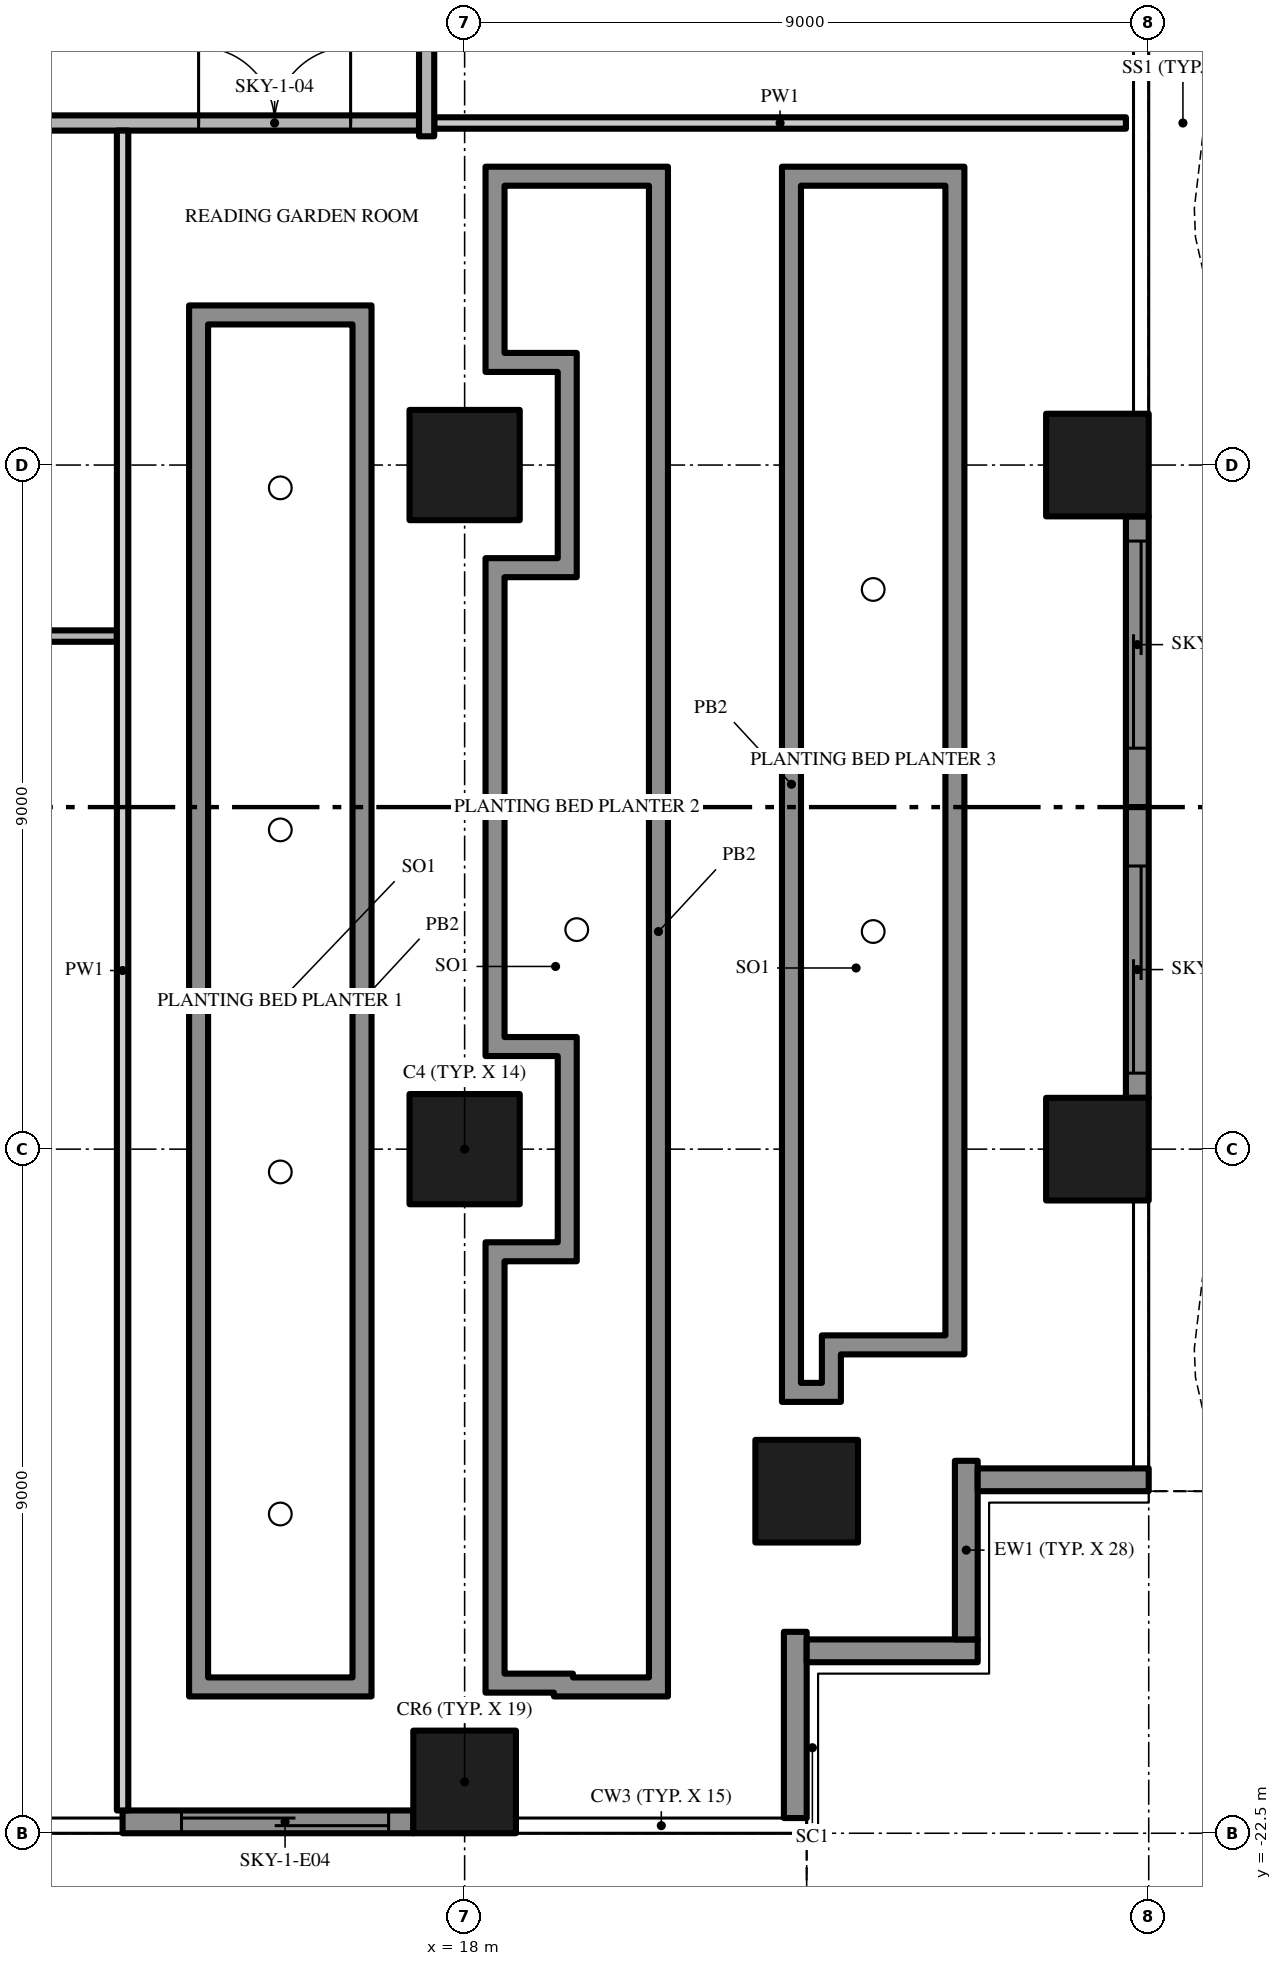
"""IFC4 building model, lengths in metres.
Left out: names, types, materials, properties, quantities, classifications, styles, units other than length and angle.
Written with IfcOpenShell. Run it as: python <this file> out.ifc"""

import sys

from ifc_helpers import new_model, si_unit, direction, frame, frame_2d, origin, origin_2d, place, context, subcontext, project, spatial, polyline, rectangle, outline, extrude, element, fill, save


model = new_model("IFC4")
c1 = context("Model", 3, precision=1e-05, world=origin(), true_north=direction((0.0, 1.0)))
c2 = subcontext(c1, "Body", "Model", "MODEL_VIEW")
j1 = project(units=[si_unit("LENGTHUNIT", "METRE"), si_unit("PLANEANGLEUNIT", "RADIAN")], contexts=[c1])
p1 = place(None, origin())
s1 = spatial("IfcSite", under=j1, at=p1, CompositionType="ELEMENT")
p2 = place(p1, origin())
s2 = spatial("IfcBuilding", under=s1, at=p2, CompositionType="ELEMENT")
p3 = place(p2, frame((0.0, 0.0, 64.4)))
s3 = spatial("IfcBuildingStorey", under=s2, at=p3, CompositionType="ELEMENT", Elevation=64.4)
p4 = place(p3, frame((18.0, -13.5, 0.0), z_axis=(0.0, 0.0, 1.0), x_axis=(1.0, 0.0, 0.0)))
e1 = element("IfcColumn", 1, at=p4, inside=s3, PredefinedType="COLUMN", context=c2, shape_type="SweptSolid", body=[
    extrude(rectangle(XDim=1.45, YDim=1.45, at=origin_2d()), origin(), (0.0, 0.0, 1.0), 4.7),
])
p5 = place(p3, frame((18.0, -21.825, 0.0), z_axis=(0.0, 0.0, 1.0), x_axis=(1.0, 0.0, 0.0)))
e2 = element("IfcColumn", 2, at=p5, inside=s3, PredefinedType="COLUMN", context=c2, shape_type="SweptSolid", body=[
    extrude(rectangle(XDim=1.35, YDim=1.35, at=origin_2d()), origin(), (0.0, 0.0, 1.0), 4.7),
])
p6 = place(p3, frame((18.0, -4.5, 0.0), z_axis=(0.0, 0.0, 1.0), x_axis=(1.0, 0.0, 0.0)))
e3 = element("IfcColumn", 3, at=p6, inside=s3, PredefinedType="COLUMN", context=c2, shape_type="SweptSolid", body=[
    extrude(rectangle(XDim=1.45, YDim=1.45, at=origin_2d()), origin(), (0.0, 0.0, 1.0), 4.7),
])
for number, where, z_axis, x_axis in (
    (4, (26.325, -13.5, 0.0), (0.0, 0.0, 1.0), (1.0, 0.0, 0.0)),
    (5, (22.5, -18.0, 0.0), (0.0, 0.0, 1.0), (1.0, 0.0, 0.0)),
    (6, (26.325, -4.5, 0.0), (0.0, 0.0, 1.0), (1.0, 0.0, 0.0)),
):
    element("IfcColumn", number, at=place(p3, frame(where, z_axis=z_axis, x_axis=x_axis)), inside=s3, PredefinedType="COLUMN", context=c2, shape_type="SweptSolid", body=[
        extrude(rectangle(XDim=1.35, YDim=1.35, at=origin_2d()), origin(), (0.0, 0.0, 1.0), 4.7),
    ])
p7 = place(p3, frame((17.325, -22.35, 0.0), z_axis=(0.0, 0.0, 1.0), x_axis=(-1.0, 0.0, 0.0)))
e7 = element("IfcWall", 7, at=p7, inside=s3, PredefinedType="SOLIDWALL", context=c2, shape_type="SweptSolid", body=[
    extrude(rectangle(XDim=3.825, YDim=0.3, at=frame_2d((1.913, 0.0))), origin(), (0.0, 0.0, 1.0), 4.7),
])
p8 = place(p7, frame((0.325, 0.0, 0.0)))
e8 = element("IfcOpeningElement", 8, at=p8, cuts=e7, PredefinedType="OPENING", context=c2, shape_type="SweptSolid", body=[
    extrude(rectangle(XDim=2.725, YDim=2.4, at=frame_2d((1.363, 1.2))), frame((0.0, 0.16, 0.0), z_axis=(0.0, -1.0, 0.0), x_axis=(1.0, 0.0, 0.0)), (0.0, 0.0, 1.0), 0.32),
])
p9 = place(p3, frame((22.35, -19.85, 0.0), z_axis=(0.0, 0.0, 1.0), x_axis=(0.0, -1.0, 0.0)))
e9 = element("IfcWall", 9, at=p9, inside=s3, PredefinedType="SOLIDWALL", context=c2, shape_type="SweptSolid", body=[
    extrude(rectangle(XDim=2.45, YDim=0.3, at=frame_2d((1.225, 0.0))), origin(), (0.0, 0.0, 1.0), 4.7),
])
p10 = place(p3, frame((24.75, -20.1, 0.0), z_axis=(0.0, 0.0, 1.0), x_axis=(-1.0, 0.0, 0.0)))
e10 = element("IfcWall", 10, at=p10, inside=s3, PredefinedType="SOLIDWALL", context=c2, shape_type="SweptSolid", body=[
    extrude(rectangle(XDim=2.25, YDim=0.3, at=frame_2d((1.125, 0.0))), origin(), (0.0, 0.0, 1.0), 4.7),
])
p11 = place(p3, frame((24.6, -17.6, 0.0), z_axis=(0.0, 0.0, 1.0), x_axis=(0.0, -1.0, 0.0)))
e11 = element("IfcWall", 11, at=p11, inside=s3, PredefinedType="SOLIDWALL", context=c2, shape_type="SweptSolid", body=[
    extrude(rectangle(XDim=2.35, YDim=0.3, at=frame_2d((1.175, 0.0))), origin(), (0.0, 0.0, 1.0), 4.7),
])
p12 = place(p3, frame((27.0, -17.85, 0.0), z_axis=(0.0, 0.0, 1.0), x_axis=(-1.0, 0.0, 0.0)))
e12 = element("IfcWall", 12, at=p12, inside=s3, PredefinedType="SOLIDWALL", context=c2, shape_type="SweptSolid", body=[
    extrude(rectangle(XDim=2.25, YDim=0.3, at=frame_2d((1.125, 0.0))), origin(), (0.0, 0.0, 1.0), 4.7),
])
p13 = place(p3, frame((26.85, -9.0, 0.0), z_axis=(0.0, 0.0, 1.0), x_axis=(0.0, -1.0, 0.0)))
e13 = element("IfcWall", 13, at=p13, inside=s3, PredefinedType="SOLIDWALL", context=c2, shape_type="SweptSolid", body=[
    extrude(rectangle(XDim=3.825, YDim=0.3, at=frame_2d((1.913, 0.0))), origin(), (0.0, 0.0, 1.0), 4.7),
])
p14 = place(p13, frame((0.775, 0.0, 0.0)))
e14 = element("IfcOpeningElement", 14, at=p14, cuts=e13, PredefinedType="OPENING", context=c2, shape_type="SweptSolid", body=[
    extrude(rectangle(XDim=2.725, YDim=2.4, at=frame_2d((1.363, 1.2))), frame((0.0, 0.16, 0.0), z_axis=(0.0, -1.0, 0.0), x_axis=(1.0, 0.0, 0.0)), (0.0, 0.0, 1.0), 0.32),
])
p15 = place(p3, frame((26.85, -5.175, 0.0), z_axis=(0.0, 0.0, 1.0), x_axis=(0.0, -1.0, 0.0)))
e15 = element("IfcWall", 15, at=p15, inside=s3, PredefinedType="SOLIDWALL", context=c2, shape_type="SweptSolid", body=[
    extrude(rectangle(XDim=3.825, YDim=0.3, at=frame_2d((1.913, 0.0))), origin(), (0.0, 0.0, 1.0), 4.7),
])
p16 = place(p15, frame((0.325, 0.0, 0.0)))
e16 = element("IfcOpeningElement", 16, at=p16, cuts=e15, PredefinedType="OPENING", context=c2, shape_type="SweptSolid", body=[
    extrude(rectangle(XDim=2.725, YDim=2.4, at=frame_2d((1.363, 1.2))), frame((0.0, 0.16, 0.0), z_axis=(0.0, -1.0, 0.0), x_axis=(1.0, 0.0, 0.0)), (0.0, 0.0, 1.0), 0.32),
])
p17 = place(p3, origin())
e17 = element("IfcWall", 17, at=p17, inside=s3, PredefinedType="USERDEFINED", context=c2, shape_type="SweptSolid", body=[
    extrude(outline(polyline([(-22.5, -23.451), (-21.0, -23.115), (-20.625, -23.1), (-19.5, -23.231), (-18.0, -23.755), (-16.5, -24.488), (-15.0, -25.149), (-13.5, -25.485), (-13.125, -25.5), (-12.0, -25.369), (-10.5, -24.845), (-9.0, -24.112), (-7.5, -23.451), (-6.0, -23.115), (-5.625, -23.1), (-4.5, -23.231), (-3.0, -23.755), (-1.5, -24.488), (0.0, -25.149), (1.5, -25.485), (1.875, -25.5), (3.0, -25.369), (4.5, -24.845), (6.0, -24.112), (7.5, -23.451), (9.0, -23.115), (9.375, -23.1), (10.5, -23.231), (12.0, -23.755), (13.5, -24.488), (15.0, -25.149), (16.5, -25.485), (16.875, -25.5), (18.0, -25.369), (19.5, -24.845), (21.0, -24.112), (22.5, -23.451), (22.399, -23.223), (20.895, -23.885), (19.404, -24.614), (17.944, -25.124), (16.865, -25.249), (16.533, -25.236), (15.079, -24.91), (13.605, -24.261), (12.096, -23.524), (10.556, -22.986), (9.385, -22.849), (8.967, -22.866), (7.421, -23.213), (5.895, -23.885), (4.404, -24.614), (2.944, -25.124), (1.865, -25.249), (1.533, -25.236), (0.079, -24.91), (-1.395, -24.261), (-2.904, -23.524), (-4.444, -22.986), (-5.615, -22.849), (-6.033, -22.866), (-7.579, -23.213), (-9.105, -23.885), (-10.596, -24.614), (-12.056, -25.124), (-13.135, -25.249), (-13.467, -25.236), (-14.921, -24.91), (-16.395, -24.261), (-17.904, -23.524), (-19.444, -22.986), (-20.615, -22.849), (-21.033, -22.866), (-22.555, -23.208), (-22.5, -23.451)])), origin(), (0.0, 0.0, 1.0), 0.9),
])
p18 = place(p3, origin())
e18 = element("IfcWall", 18, at=p18, inside=s3, PredefinedType="USERDEFINED", context=c2, shape_type="SweptSolid", body=[
    extrude(outline(polyline([(27.951, -18.0), (27.615, -16.5), (27.6, -16.125), (27.731, -15.0), (28.255, -13.5), (28.988, -12.0), (29.649, -10.5), (29.985, -9.0), (30.0, -8.625), (29.869, -7.5), (29.345, -6.0), (28.612, -4.5), (27.951, -3.0), (27.615, -1.5), (27.6, -1.125), (27.731, 0.0), (28.255, 1.5), (28.988, 3.0), (29.649, 4.5), (29.985, 6.0), (30.0, 6.375), (29.869, 7.5), (29.345, 9.0), (28.612, 10.5), (27.951, 12.0), (27.615, 13.5), (27.6, 13.875), (27.731, 15.0), (28.255, 16.5), (28.988, 18.0), (28.763, 18.11), (28.024, 16.596), (27.486, 15.056), (27.349, 13.885), (27.366, 13.467), (27.713, 11.921), (28.385, 10.395), (29.114, 8.904), (29.624, 7.444), (29.749, 6.365), (29.736, 6.033), (29.41, 4.579), (28.761, 3.105), (28.024, 1.596), (27.486, 0.056), (27.349, -1.115), (27.366, -1.533), (27.713, -3.079), (28.385, -4.605), (29.114, -6.096), (29.624, -7.556), (29.749, -8.635), (29.736, -8.967), (29.41, -10.421), (28.761, -11.895), (28.024, -13.404), (27.486, -14.944), (27.349, -16.115), (27.366, -16.533), (27.708, -18.055), (27.951, -18.0)])), origin(), (0.0, 0.0, 1.0), 0.9),
])
p19 = place(p3, frame((-11.15, -6.75, 0.0), z_axis=(0.0, 0.0, 1.0), x_axis=(1.0, 0.0, 0.0)))
e19 = element("IfcWall", 19, at=p19, inside=s3, PredefinedType="PARTITIONING", context=c2, shape_type="SweptSolid", body=[
    extrude(rectangle(XDim=24.575, YDim=0.15, at=frame_2d((12.287, 0.0))), origin(), (0.0, 0.0, 1.0), 4.7),
])
p20 = place(p19, frame((11.35, 0.0, 0.0)))
e20 = element("IfcOpeningElement", 20, at=p20, cuts=e19, PredefinedType="OPENING", context=c2, shape_type="SweptSolid", body=[
    extrude(rectangle(XDim=1.8, YDim=2.4, at=frame_2d((0.9, 1.2))), frame((0.0, 0.085, 0.0), z_axis=(0.0, -1.0, 0.0), x_axis=(1.0, 0.0, 0.0)), (0.0, 0.0, 1.0), 0.17),
])
p21 = place(p3, frame((-11.15, 0.0, 0.0), z_axis=(0.0, 0.0, 1.0), x_axis=(1.0, 0.0, 0.0)))
e21 = element("IfcWall", 21, at=p21, inside=s3, PredefinedType="PARTITIONING", context=c2, shape_type="SweptSolid", body=[
    extrude(rectangle(XDim=28.55, YDim=0.2, at=frame_2d((14.275, 0.0))), origin(), (0.0, 0.0, 1.0), 4.7),
])
p22 = place(p21, frame((11.25, 0.0, 0.0)))
e22 = element("IfcOpeningElement", 22, at=p22, cuts=e21, PredefinedType="OPENING", context=c2, shape_type="SweptSolid", body=[
    extrude(rectangle(XDim=2.0, YDim=2.4, at=frame_2d((1.0, 1.2))), frame((0.0, 0.11, 0.0), z_axis=(0.0, -1.0, 0.0), x_axis=(1.0, 0.0, 0.0)), (0.0, 0.0, 1.0), 0.22),
])
p23 = place(p21, frame((25.65, 0.0, 0.0)))
e23 = element("IfcOpeningElement", 23, at=p23, cuts=e21, PredefinedType="OPENING", context=c2, shape_type="SweptSolid", body=[
    extrude(rectangle(XDim=2.0, YDim=2.4, at=frame_2d((1.0, 1.2))), frame((0.0, 0.11, 0.0), z_axis=(0.0, -1.0, 0.0), x_axis=(1.0, 0.0, 0.0)), (0.0, 0.0, 1.0), 0.22),
])
p24 = place(p3, frame((17.6, 0.0, 0.0), z_axis=(0.0, 0.0, 1.0), x_axis=(1.0, 0.0, 0.0)))
e24 = element("IfcWall", 24, at=p24, inside=s3, PredefinedType="PARTITIONING", context=c2, shape_type="SweptSolid", body=[
    extrude(rectangle(XDim=9.1, YDim=0.15, at=frame_2d((4.55, 0.0))), origin(), (0.0, 0.0, 1.0), 4.7),
])
p25 = place(p3, frame((13.5, -22.2, 0.0), z_axis=(0.0, 0.0, 1.0), x_axis=(0.0, 1.0, 0.0)))
e25 = element("IfcWall", 25, at=p25, inside=s3, PredefinedType="PARTITIONING", context=c2, shape_type="SweptSolid", body=[
    extrude(rectangle(XDim=22.1, YDim=0.15, at=frame_2d((11.05, 0.0))), origin(), (0.0, 0.0, 1.0), 4.7),
])
p26 = place(p3, frame((17.5, -0.175, 0.0), z_axis=(0.0, 0.0, 1.0), x_axis=(0.0, 1.0, 0.0)))
e26 = element("IfcWall", 26, at=p26, inside=s3, PredefinedType="PARTITIONING", context=c2, shape_type="SweptSolid", body=[
    extrude(rectangle(XDim=3.95, YDim=0.2, at=frame_2d((1.975, 0.0))), origin(), (0.0, 0.0, 1.0), 4.7),
])
p27 = place(p3, origin())
e27 = element("IfcWall", 27, at=p27, inside=s3, PredefinedType="USERDEFINED", context=c2, shape_type="SweptSolid", body=[
    extrude(outline(polyline([(16.775, -20.7), (16.775, -2.4), (14.375, -2.4), (14.375, -20.7), (16.775, -20.7)]), holes=[polyline([(14.625, -20.45), (14.625, -2.65), (16.525, -2.65), (16.525, -20.45), (14.625, -20.45)])]), origin(), (0.0, 0.0, 1.0), 0.9),
])
p28 = place(p3, origin())
e28 = element("IfcWall", 28, at=p28, inside=s3, PredefinedType="USERDEFINED", context=c2, shape_type="SweptSolid", body=[
    extrude(outline(polyline([(20.675, -20.7), (20.675, -0.575), (18.275, -0.575), (18.275, -3.275), (19.225, -3.275), (19.225, -5.725), (18.275, -5.725), (18.275, -12.275), (19.225, -12.275), (19.225, -14.725), (18.275, -14.725), (18.275, -20.65), (19.175, -20.65), (19.175, -20.7), (20.675, -20.7)]), holes=[polyline([(19.425, -20.45), (19.425, -20.4), (18.525, -20.4), (18.525, -14.975), (19.475, -14.975), (19.475, -12.025), (18.525, -12.025), (18.525, -5.975), (19.475, -5.975), (19.475, -3.025), (18.525, -3.025), (18.525, -0.825), (20.425, -0.825), (20.425, -20.45), (19.425, -20.45)])]), origin(), (0.0, 0.0, 1.0), 0.9),
])
p29 = place(p3, origin())
e29 = element("IfcWall", 29, at=p29, inside=s3, PredefinedType="USERDEFINED", context=c2, shape_type="SweptSolid", body=[
    extrude(outline(polyline([(24.575, -16.2), (24.575, -0.575), (22.175, -0.575), (22.175, -16.825), (22.95, -16.825), (22.95, -16.2), (24.575, -16.2)]), holes=[polyline([(22.7, -15.95), (22.7, -16.575), (22.425, -16.575), (22.425, -0.825), (24.325, -0.825), (24.325, -15.95), (22.7, -15.95)])]), origin(), (0.0, 0.0, 1.0), 0.9),
])
p30 = place(p8, origin())
e30 = element("IfcDoor", 30, at=p30, inside=s3, OperationType="SINGLE_SWING_LEFT", PredefinedType="DOOR", context=c2, shape_type="SweptSolid", body=[
    extrude(rectangle(XDim=2.725, YDim=2.4, at=frame_2d((1.363, 1.2))), frame((0.0, 0.025, 0.0), z_axis=(0.0, -1.0, 0.0), x_axis=(1.0, 0.0, 0.0)), (0.0, 0.0, 1.0), 0.05),
])
fill(e8, e30)
p31 = place(p14, origin())
e31 = element("IfcDoor", 31, at=p31, inside=s3, OperationType="SINGLE_SWING_LEFT", PredefinedType="DOOR", context=c2, shape_type="SweptSolid", body=[
    extrude(rectangle(XDim=2.725, YDim=2.4, at=frame_2d((1.363, 1.2))), frame((0.0, 0.025, 0.0), z_axis=(0.0, -1.0, 0.0), x_axis=(1.0, 0.0, 0.0)), (0.0, 0.0, 1.0), 0.05),
])
fill(e14, e31)
p32 = place(p16, origin())
e32 = element("IfcDoor", 32, at=p32, inside=s3, OperationType="SINGLE_SWING_LEFT", PredefinedType="DOOR", context=c2, shape_type="SweptSolid", body=[
    extrude(rectangle(XDim=2.725, YDim=2.4, at=frame_2d((1.363, 1.2))), frame((0.0, 0.025, 0.0), z_axis=(0.0, -1.0, 0.0), x_axis=(1.0, 0.0, 0.0)), (0.0, 0.0, 1.0), 0.05),
])
fill(e16, e32)
p33 = place(p23, origin())
e33 = element("IfcDoor", 33, at=p33, inside=s3, OperationType="DOUBLE_DOOR_SINGLE_SWING", PredefinedType="DOOR", context=c2, shape_type="SweptSolid", body=[
    extrude(rectangle(XDim=2.0, YDim=2.4, at=frame_2d((1.0, 1.2))), frame((0.0, 0.025, 0.0), z_axis=(0.0, -1.0, 0.0), x_axis=(1.0, 0.0, 0.0)), (0.0, 0.0, 1.0), 0.05),
])
fill(e23, e33)
save(model, sys.argv[1])
